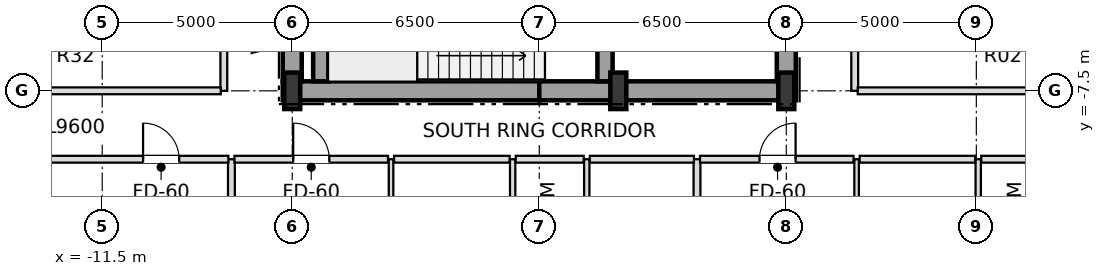
"""IFC4 building model, lengths in metres.
Left out: names, types, materials, properties, quantities, classifications, styles, units other than length and angle.
Written with IfcOpenShell. Run it as: python <this file> out.ifc"""

import sys

from ifc_helpers import new_model, si_unit, direction, frame, frame_2d, origin, origin_2d, place, context, subcontext, project, spatial, rectangle, i_section, extrude, element, fill, save


model = new_model("IFC4")
c1 = context("Model", 3, precision=1e-05, world=origin(), true_north=direction((0.0, 1.0)))
c2 = subcontext(c1, "Body", "Model", "MODEL_VIEW")
j1 = project(units=[si_unit("LENGTHUNIT", "METRE"), si_unit("PLANEANGLEUNIT", "RADIAN")], contexts=[c1])
p1 = place(None, origin())
s1 = spatial("IfcSite", under=j1, at=p1, CompositionType="ELEMENT")
p2 = place(p1, origin())
s2 = spatial("IfcBuilding", under=s1, at=p2, CompositionType="ELEMENT")
p3 = place(p2, frame((0.0, 0.0, 27.6)))
s3 = spatial("IfcBuildingStorey", under=s2, at=p3, CompositionType="ELEMENT", Elevation=27.6)
for number, where, z_axis, x_axis in (
    (1, (-6.5, -7.5, 0.0), (0.0, 0.0, 1.0), (1.0, 0.0, 0.0)),
    (2, (2.08, -7.5, 0.0), (0.0, 0.0, 1.0), (1.0, 0.0, 0.0)),
    (3, (6.5, -7.5, 0.0), (0.0, 0.0, 1.0), (1.0, 0.0, 0.0)),
):
    element("IfcColumn", number, at=place(p3, frame(where, z_axis=z_axis, x_axis=x_axis)), inside=s3, PredefinedType="COLUMN", context=c2, shape_type="SweptSolid", body=[
        extrude(i_section(OverallWidth=0.42, OverallDepth=0.96, WebThickness=0.022, FlangeThickness=0.034, at=origin_2d()), origin(), (0.0, 0.0, 1.0), 4.8),
    ])
for number, where, z_axis, x_axis in (
    (4, (-6.75, -7.5, 0.0), (0.0, 0.0, 1.0), (1.0, 0.0, 0.0)),
    (5, (0.0, -7.5, 0.0), (0.0, 0.0, 1.0), (1.0, 0.0, 0.0)),
):
    element("IfcWall", number, at=place(p3, frame(where, z_axis=z_axis, x_axis=x_axis)), inside=s3, PredefinedType="SHEAR", context=c2, shape_type="SweptSolid", body=[
        extrude(rectangle(XDim=6.75, YDim=0.5, at=frame_2d((3.375, 0.0))), origin(), (0.0, 0.0, 1.0), 4.58),
    ])
p4 = place(p3, frame((-6.5, -7.25, 0.0), z_axis=(0.0, 0.0, 1.0), x_axis=(0.0, 1.0, 0.0)))
e6 = element("IfcWall", 6, at=p4, inside=s3, PredefinedType="SHEAR", context=c2, shape_type="SweptSolid", body=[
    extrude(rectangle(XDim=3.55, YDim=0.5, at=frame_2d((1.775, 0.0))), origin(), (0.0, 0.0, 1.0), 4.58),
])
p5 = place(p3, frame((6.5, -7.25, 0.0), z_axis=(0.0, 0.0, 1.0), x_axis=(0.0, 1.0, 0.0)))
e7 = element("IfcWall", 7, at=p5, inside=s3, PredefinedType="SHEAR", context=c2, shape_type="SweptSolid", body=[
    extrude(rectangle(XDim=5.75, YDim=0.5, at=frame_2d((2.875, 0.0))), origin(), (0.0, 0.0, 1.0), 4.58),
])
p6 = place(p5, frame((0.85, 0.0, 0.0)))
e8 = element("IfcOpeningElement", 8, at=p6, cuts=e7, PredefinedType="OPENING", context=c2, shape_type="SweptSolid", body=[
    extrude(rectangle(XDim=1.05, YDim=2.15, at=frame_2d((0.525, 1.075))), frame((0.0, 0.26, 0.0), z_axis=(0.0, -1.0, 0.0), x_axis=(1.0, 0.0, 0.0)), (0.0, 0.0, 1.0), 0.52),
])
p7 = place(p3, frame((-5.75, -7.25, 0.0), z_axis=(0.0, 0.0, 1.0), x_axis=(0.0, 1.0, 0.0)))
e9 = element("IfcWall", 9, at=p7, inside=s3, PredefinedType="SHEAR", context=c2, shape_type="SweptSolid", body=[
    extrude(rectangle(XDim=2.9, YDim=0.4, at=frame_2d((1.45, 0.0))), origin(), (0.0, 0.0, 1.0), 4.58),
])
p8 = place(p3, frame((1.73, -7.25, 0.0), z_axis=(0.0, 0.0, 1.0), x_axis=(0.0, 1.0, 0.0)))
e10 = element("IfcWall", 10, at=p8, inside=s3, PredefinedType="SHEAR", context=c2, shape_type="SweptSolid", body=[
    extrude(rectangle(XDim=3.3, YDim=0.4, at=frame_2d((1.65, 0.0))), origin(), (0.0, 0.0, 1.0), 4.58),
])
p9 = place(p8, frame((0.9, 0.0, 0.0)))
e11 = element("IfcOpeningElement", 11, at=p9, cuts=e10, PredefinedType="OPENING", context=c2, shape_type="SweptSolid", body=[
    extrude(rectangle(XDim=1.05, YDim=2.15, at=frame_2d((0.525, 1.075))), frame((0.0, 0.21, 0.0), z_axis=(0.0, -1.0, 0.0), x_axis=(1.0, 0.0, 0.0)), (0.0, 0.0, 1.0), 0.42),
])
p10 = place(p3, frame((-8.3, -7.5, 0.0), z_axis=(0.0, 0.0, 1.0), x_axis=(0.0, 1.0, 0.0)))
e12 = element("IfcWall", 12, at=p10, inside=s3, PredefinedType="PARTITIONING", context=c2, shape_type="SweptSolid", body=[
    extrude(rectangle(XDim=15.0, YDim=0.18, at=frame_2d((7.5, 0.0))), origin(), (0.0, 0.0, 1.0), 4.58),
])
p11 = place(p10, frame((2.965, 0.0, 0.0)))
e13 = element("IfcOpeningElement", 13, at=p11, cuts=e12, PredefinedType="OPENING", context=c2, shape_type="SweptSolid", body=[
    extrude(rectangle(XDim=0.95, YDim=2.15, at=frame_2d((0.475, 1.075))), frame((0.0, 0.1, 0.0), z_axis=(0.0, -1.0, 0.0), x_axis=(1.0, 0.0, 0.0)), (0.0, 0.0, 1.0), 0.2),
])
p12 = place(p10, frame((10.465, 0.0, 0.0)))
e14 = element("IfcOpeningElement", 14, at=p12, cuts=e12, PredefinedType="OPENING", context=c2, shape_type="SweptSolid", body=[
    extrude(rectangle(XDim=0.95, YDim=2.15, at=frame_2d((0.475, 1.075))), frame((0.0, 0.1, 0.0), z_axis=(0.0, -1.0, 0.0), x_axis=(1.0, 0.0, 0.0)), (0.0, 0.0, 1.0), 0.2),
])
p13 = place(p3, frame((-8.1, -24.9, 0.0), z_axis=(0.0, 0.0, 1.0), x_axis=(0.0, 1.0, 0.0)))
e15 = element("IfcWall", 15, at=p13, inside=s3, PredefinedType="PARTITIONING", context=c2, shape_type="SweptSolid", body=[
    extrude(rectangle(XDim=15.6, YDim=0.18, at=frame_2d((7.8, 0.0))), origin(), (0.0, 0.0, 1.0), 4.016),
])
p14 = place(p3, frame((-3.9, -24.9, 0.0), z_axis=(0.0, 0.0, 1.0), x_axis=(0.0, 1.0, 0.0)))
e16 = element("IfcWall", 16, at=p14, inside=s3, PredefinedType="PARTITIONING", context=c2, shape_type="SweptSolid", body=[
    extrude(rectangle(XDim=15.6, YDim=0.12, at=frame_2d((7.8, 0.0))), origin(), (0.0, 0.0, 1.0), 4.016),
])
p15 = place(p14, frame((10.325, 0.0, 0.0)))
e17 = element("IfcOpeningElement", 17, at=p15, cuts=e16, PredefinedType="OPENING", context=c2, shape_type="SweptSolid", body=[
    extrude(rectangle(XDim=0.95, YDim=2.1, at=frame_2d((0.475, 1.05))), frame((0.0, 0.07, 0.0), z_axis=(0.0, -1.0, 0.0), x_axis=(1.0, 0.0, 0.0)), (0.0, 0.0, 1.0), 0.14),
])
p16 = place(p14, frame((2.55, 0.0, 0.0)))
e18 = element("IfcOpeningElement", 18, at=p16, cuts=e16, PredefinedType="OPENING", context=c2, shape_type="SweptSolid", body=[
    extrude(rectangle(XDim=0.9, YDim=2.1, at=frame_2d((0.45, 1.05))), frame((0.0, 0.07, 0.0), z_axis=(0.0, -1.0, 0.0), x_axis=(1.0, 0.0, 0.0)), (0.0, 0.0, 1.0), 0.14),
])
p17 = place(p3, frame((-0.7, -24.9, 0.0), z_axis=(0.0, 0.0, 1.0), x_axis=(0.0, 1.0, 0.0)))
e19 = element("IfcWall", 19, at=p17, inside=s3, PredefinedType="PARTITIONING", context=c2, shape_type="SweptSolid", body=[
    extrude(rectangle(XDim=15.6, YDim=0.14, at=frame_2d((7.8, 0.0))), origin(), (0.0, 0.0, 1.0), 4.016),
])
p18 = place(p17, frame((10.35, 0.0, 0.0)))
e20 = element("IfcOpeningElement", 20, at=p18, cuts=e19, PredefinedType="OPENING", context=c2, shape_type="SweptSolid", body=[
    extrude(rectangle(XDim=0.9, YDim=2.1, at=frame_2d((0.45, 1.05))), frame((0.0, 0.08, 0.0), z_axis=(0.0, -1.0, 0.0), x_axis=(1.0, 0.0, 0.0)), (0.0, 0.0, 1.0), 0.16),
])
p19 = place(p17, frame((2.55, 0.0, 0.0)))
e21 = element("IfcOpeningElement", 21, at=p19, cuts=e19, PredefinedType="OPENING", context=c2, shape_type="SweptSolid", body=[
    extrude(rectangle(XDim=0.9, YDim=2.1, at=frame_2d((0.45, 1.05))), frame((0.0, 0.08, 0.0), z_axis=(0.0, -1.0, 0.0), x_axis=(1.0, 0.0, 0.0)), (0.0, 0.0, 1.0), 0.16),
])
p20 = place(p3, frame((1.25, -18.9, 0.0), z_axis=(0.0, 0.0, 1.0), x_axis=(0.0, 1.0, 0.0)))
e22 = element("IfcWall", 22, at=p20, inside=s3, PredefinedType="PARTITIONING", context=c2, shape_type="SweptSolid", body=[
    extrude(rectangle(XDim=9.6, YDim=0.14, at=frame_2d((4.8, 0.0))), origin(), (0.0, 0.0, 1.0), 4.148),
])
p21 = place(p3, frame((4.15, -24.9, 0.0), z_axis=(0.0, 0.0, 1.0), x_axis=(0.0, 1.0, 0.0)))
e23 = element("IfcWall", 23, at=p21, inside=s3, PredefinedType="PARTITIONING", context=c2, shape_type="SweptSolid", body=[
    extrude(rectangle(XDim=15.6, YDim=0.18, at=frame_2d((7.8, 0.0))), origin(), (0.0, 0.0, 1.0), 4.016),
])
p22 = place(p3, frame((8.3, -7.5, 0.0), z_axis=(0.0, 0.0, 1.0), x_axis=(0.0, 1.0, 0.0)))
e24 = element("IfcWall", 24, at=p22, inside=s3, PredefinedType="PARTITIONING", context=c2, shape_type="SweptSolid", body=[
    extrude(rectangle(XDim=15.0, YDim=0.18, at=frame_2d((7.5, 0.0))), origin(), (0.0, 0.0, 1.0), 4.58),
])
p23 = place(p22, frame((2.995, 0.0, 0.0)))
e25 = element("IfcOpeningElement", 25, at=p23, cuts=e24, PredefinedType="OPENING", context=c2, shape_type="SweptSolid", body=[
    extrude(rectangle(XDim=0.95, YDim=2.15, at=frame_2d((0.475, 1.075))), frame((0.0, 0.1, 0.0), z_axis=(0.0, -1.0, 0.0), x_axis=(1.0, 0.0, 0.0)), (0.0, 0.0, 1.0), 0.2),
])
p24 = place(p22, frame((10.495, 0.0, 0.0)))
e26 = element("IfcOpeningElement", 26, at=p24, cuts=e24, PredefinedType="OPENING", context=c2, shape_type="SweptSolid", body=[
    extrude(rectangle(XDim=0.95, YDim=2.15, at=frame_2d((0.475, 1.075))), frame((0.0, 0.1, 0.0), z_axis=(0.0, -1.0, 0.0), x_axis=(1.0, 0.0, 0.0)), (0.0, 0.0, 1.0), 0.2),
])
p25 = place(p3, frame((8.35, -18.9, 0.0), z_axis=(0.0, 0.0, 1.0), x_axis=(0.0, 1.0, 0.0)))
e27 = element("IfcWall", 27, at=p25, inside=s3, PredefinedType="PARTITIONING", context=c2, shape_type="SweptSolid", body=[
    extrude(rectangle(XDim=9.6, YDim=0.12, at=frame_2d((4.8, 0.0))), origin(), (0.0, 0.0, 1.0), 4.016),
])
p26 = place(p25, frame((4.325, 0.0, 0.0)))
e28 = element("IfcOpeningElement", 28, at=p26, cuts=e27, PredefinedType="OPENING", context=c2, shape_type="SweptSolid", body=[
    extrude(rectangle(XDim=0.95, YDim=2.1, at=frame_2d((0.475, 1.05))), frame((0.0, 0.07, 0.0), z_axis=(0.0, -1.0, 0.0), x_axis=(1.0, 0.0, 0.0)), (0.0, 0.0, 1.0), 0.14),
])
p27 = place(p3, frame((11.55, -18.9, 0.0), z_axis=(0.0, 0.0, 1.0), x_axis=(0.0, 1.0, 0.0)))
e29 = element("IfcWall", 29, at=p27, inside=s3, PredefinedType="PARTITIONING", context=c2, shape_type="SweptSolid", body=[
    extrude(rectangle(XDim=9.6, YDim=0.14, at=frame_2d((4.8, 0.0))), origin(), (0.0, 0.0, 1.0), 3.936),
])
p28 = place(p27, frame((4.35, 0.0, 0.0)))
e30 = element("IfcOpeningElement", 30, at=p28, cuts=e29, PredefinedType="OPENING", context=c2, shape_type="SweptSolid", body=[
    extrude(rectangle(XDim=0.9, YDim=2.1, at=frame_2d((0.45, 1.05))), frame((0.0, 0.08, 0.0), z_axis=(0.0, -1.0, 0.0), x_axis=(1.0, 0.0, 0.0)), (0.0, 0.0, 1.0), 0.16),
])
p29 = place(p3, frame((-13.67, -9.3, 0.0), z_axis=(0.0, 0.0, 1.0), x_axis=(1.0, 0.0, 0.0)))
e31 = element("IfcWall", 31, at=p29, inside=s3, PredefinedType="PARTITIONING", context=c2, shape_type="SweptSolid", body=[
    extrude(rectangle(XDim=5.49, YDim=0.18, at=frame_2d((2.745, 0.0))), origin(), (0.0, 0.0, 1.0), 4.58),
])
p30 = place(p29, frame((3.245, 0.0, 0.0)))
e32 = element("IfcOpeningElement", 32, at=p30, cuts=e31, PredefinedType="OPENING", context=c2, shape_type="SweptSolid", body=[
    extrude(rectangle(XDim=0.95, YDim=2.15, at=frame_2d((0.475, 1.075))), frame((0.0, 0.1, 0.0), z_axis=(0.0, -1.0, 0.0), x_axis=(1.0, 0.0, 0.0)), (0.0, 0.0, 1.0), 0.2),
])
p31 = place(p3, frame((-8.02, -9.3, 0.0), z_axis=(0.0, 0.0, 1.0), x_axis=(1.0, 0.0, 0.0)))
e33 = element("IfcWall", 33, at=p31, inside=s3, PredefinedType="PARTITIONING", context=c2, shape_type="SweptSolid", body=[
    extrude(rectangle(XDim=4.04, YDim=0.18, at=frame_2d((2.02, 0.0))), origin(), (0.0, 0.0, 1.0), 4.016),
])
p32 = place(p31, frame((1.545, 0.0, 0.0)))
e34 = element("IfcOpeningElement", 34, at=p32, cuts=e33, PredefinedType="OPENING", context=c2, shape_type="SweptSolid", body=[
    extrude(rectangle(XDim=0.95, YDim=2.15, at=frame_2d((0.475, 1.075))), frame((0.0, 0.1, 0.0), z_axis=(0.0, -1.0, 0.0), x_axis=(1.0, 0.0, 0.0)), (0.0, 0.0, 1.0), 0.2),
])
p33 = place(p3, frame((-3.82, -9.3, 0.0), z_axis=(0.0, 0.0, 1.0), x_axis=(1.0, 0.0, 0.0)))
e35 = element("IfcWall", 35, at=p33, inside=s3, PredefinedType="PARTITIONING", context=c2, shape_type="SweptSolid", body=[
    extrude(rectangle(XDim=3.04, YDim=0.18, at=frame_2d((1.52, 0.0))), origin(), (0.0, 0.0, 1.0), 4.58),
])
p34 = place(p3, frame((-0.62, -9.3, 0.0), z_axis=(0.0, 0.0, 1.0), x_axis=(1.0, 0.0, 0.0)))
e36 = element("IfcWall", 36, at=p34, inside=s3, PredefinedType="PARTITIONING", context=c2, shape_type="SweptSolid", body=[
    extrude(rectangle(XDim=1.79, YDim=0.18, at=frame_2d((0.895, 0.0))), origin(), (0.0, 0.0, 1.0), 4.58),
])
p35 = place(p3, frame((1.33, -9.3, 0.0), z_axis=(0.0, 0.0, 1.0), x_axis=(1.0, 0.0, 0.0)))
e37 = element("IfcWall", 37, at=p35, inside=s3, PredefinedType="PARTITIONING", context=c2, shape_type="SweptSolid", body=[
    extrude(rectangle(XDim=2.74, YDim=0.18, at=frame_2d((1.37, 0.0))), origin(), (0.0, 0.0, 1.0), 4.58),
])
p36 = place(p3, frame((4.23, -9.3, 0.0), z_axis=(0.0, 0.0, 1.0), x_axis=(1.0, 0.0, 0.0)))
e38 = element("IfcWall", 38, at=p36, inside=s3, PredefinedType="PARTITIONING", context=c2, shape_type="SweptSolid", body=[
    extrude(rectangle(XDim=4.04, YDim=0.18, at=frame_2d((2.02, 0.0))), origin(), (0.0, 0.0, 1.0), 4.016),
])
p37 = place(p36, frame((1.565, 0.0, 0.0)))
e39 = element("IfcOpeningElement", 39, at=p37, cuts=e38, PredefinedType="OPENING", context=c2, shape_type="SweptSolid", body=[
    extrude(rectangle(XDim=0.95, YDim=2.15, at=frame_2d((0.475, 1.075))), frame((0.0, 0.1, 0.0), z_axis=(0.0, -1.0, 0.0), x_axis=(1.0, 0.0, 0.0)), (0.0, 0.0, 1.0), 0.2),
])
p38 = place(p3, frame((8.43, -9.3, 0.0), z_axis=(0.0, 0.0, 1.0), x_axis=(1.0, 0.0, 0.0)))
e40 = element("IfcWall", 40, at=p38, inside=s3, PredefinedType="PARTITIONING", context=c2, shape_type="SweptSolid", body=[
    extrude(rectangle(XDim=3.04, YDim=0.18, at=frame_2d((1.52, 0.0))), origin(), (0.0, 0.0, 1.0), 4.58),
])
p39 = place(p3, frame((11.63, -9.3, 0.0), z_axis=(0.0, 0.0, 1.0), x_axis=(1.0, 0.0, 0.0)))
e41 = element("IfcWall", 41, at=p39, inside=s3, PredefinedType="PARTITIONING", context=c2, shape_type="SweptSolid", body=[
    extrude(rectangle(XDim=1.79, YDim=0.18, at=frame_2d((0.895, 0.0))), origin(), (0.0, 0.0, 1.0), 4.58),
])
for number, where, z_axis, x_axis in (
    (42, (-16.02, -7.5, 0.0), (0.0, 0.0, 1.0), (1.0, 0.0, 0.0)),
    (43, (8.38, -7.5, 0.0), (0.0, 0.0, 1.0), (1.0, 0.0, 0.0)),
):
    element("IfcWall", number, at=place(p3, frame(where, z_axis=z_axis, x_axis=x_axis)), inside=s3, PredefinedType="PARTITIONING", context=c2, shape_type="SweptSolid", body=[
        extrude(rectangle(XDim=7.64, YDim=0.18, at=frame_2d((3.82, 0.0))), origin(), (0.0, 0.0, 1.0), 4.016),
    ])
p40 = place(p30, origin())
e44 = element("IfcDoor", 44, at=p40, inside=s3, OperationType="SINGLE_SWING_LEFT", PredefinedType="DOOR", context=c2, shape_type="SweptSolid", body=[
    extrude(rectangle(XDim=0.95, YDim=2.15, at=frame_2d((0.475, 1.075))), frame((0.0, 0.025, 0.0), z_axis=(0.0, -1.0, 0.0), x_axis=(1.0, 0.0, 0.0)), (0.0, 0.0, 1.0), 0.05),
])
fill(e32, e44)
p41 = place(p32, origin())
e45 = element("IfcDoor", 45, at=p41, inside=s3, OperationType="SINGLE_SWING_LEFT", PredefinedType="DOOR", context=c2, shape_type="SweptSolid", body=[
    extrude(rectangle(XDim=0.95, YDim=2.15, at=frame_2d((0.475, 1.075))), frame((0.0, 0.025, 0.0), z_axis=(0.0, -1.0, 0.0), x_axis=(1.0, 0.0, 0.0)), (0.0, 0.0, 1.0), 0.05),
])
fill(e34, e45)
p42 = place(p37, origin())
e46 = element("IfcDoor", 46, at=p42, inside=s3, OperationType="SINGLE_SWING_RIGHT", PredefinedType="DOOR", context=c2, shape_type="SweptSolid", body=[
    extrude(rectangle(XDim=0.95, YDim=2.15, at=frame_2d((0.475, 1.075))), frame((0.0, 0.025, 0.0), z_axis=(0.0, -1.0, 0.0), x_axis=(1.0, 0.0, 0.0)), (0.0, 0.0, 1.0), 0.05),
])
fill(e39, e46)
save(model, sys.argv[1])
